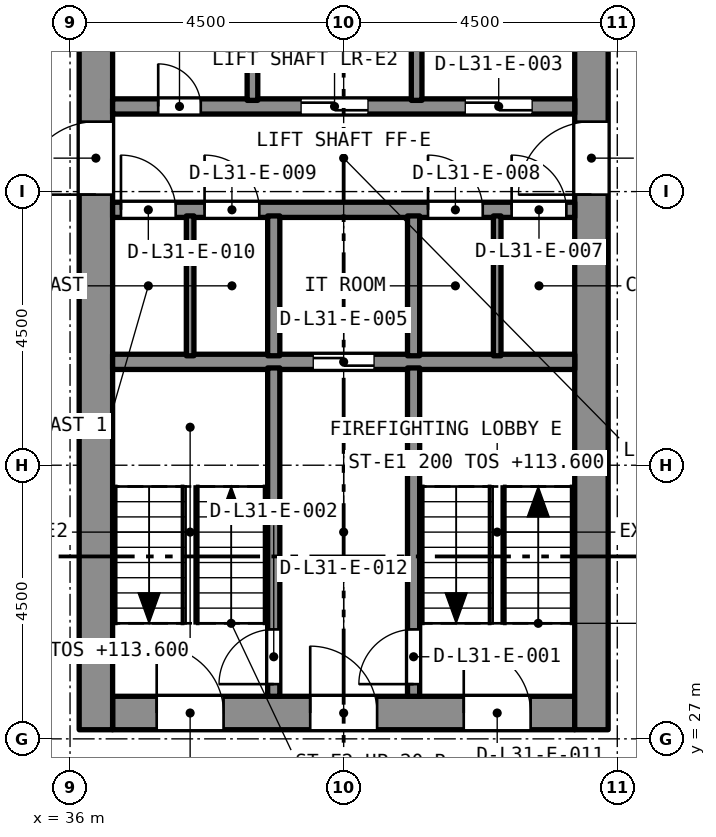
"""IFC4 building model, lengths in metres.
Left out: names, types, materials, properties, quantities, classifications, styles, units other than length and angle.
Written with IfcOpenShell. Run it as: python <this file> out.ifc"""

import sys

from ifc_helpers import new_model, si_unit, direction, frame, frame_2d, origin, place, context, subcontext, project, spatial, rectangle, extrude, element, fill, save


model = new_model("IFC4")
c1 = context("Model", 3, precision=1e-05, world=origin(), true_north=direction((0.0, 1.0)))
c2 = subcontext(c1, "Body", "Model", "MODEL_VIEW")
j1 = project(units=[si_unit("LENGTHUNIT", "METRE"), si_unit("PLANEANGLEUNIT", "RADIAN")], contexts=[c1])
p1 = place(None, origin())
s1 = spatial("IfcSite", under=j1, at=p1, CompositionType="ELEMENT")
p2 = place(p1, origin())
s2 = spatial("IfcBuilding", under=s1, at=p2, CompositionType="ELEMENT")
p3 = place(p2, frame((0.0, 0.0, 112.0)))
s3 = spatial("IfcBuildingStorey", under=s2, at=p3, CompositionType="ELEMENT", Elevation=112.0)
p4 = place(p3, frame((36.7, 27.425, 0.0), z_axis=(0.0, 0.0, 1.0), x_axis=(1.0, 0.0, 0.0)))
e1 = element("IfcWall", 1, at=p4, inside=s3, PredefinedType="SOLIDWALL", context=c2, shape_type="SweptSolid", body=[
    extrude(rectangle(XDim=7.6, YDim=0.55, at=frame_2d((3.8, 0.0))), origin(), (0.0, 0.0, 1.0), 3.2),
])
p5 = place(p4, frame((5.775, 0.0, 0.0)))
e2 = element("IfcOpeningElement", 2, at=p5, cuts=e1, PredefinedType="OPENING", context=c2, shape_type="SweptSolid", body=[
    extrude(rectangle(XDim=1.1, YDim=2.1, at=frame_2d((0.55, 1.05))), frame((0.0, 0.285, 0.0), z_axis=(0.0, -1.0, 0.0), x_axis=(1.0, 0.0, 0.0)), (0.0, 0.0, 1.0), 0.57),
])
p6 = place(p4, frame((3.25, 0.0, 0.0)))
e3 = element("IfcOpeningElement", 3, at=p6, cuts=e1, PredefinedType="OPENING", context=c2, shape_type="SweptSolid", body=[
    extrude(rectangle(XDim=1.1, YDim=2.1, at=frame_2d((0.55, 1.05))), frame((0.0, 0.285, 0.0), z_axis=(0.0, -1.0, 0.0), x_axis=(1.0, 0.0, 0.0)), (0.0, 0.0, 1.0), 0.57),
])
p7 = place(p4, frame((0.725, 0.0, 0.0)))
e4 = element("IfcOpeningElement", 4, at=p7, cuts=e1, PredefinedType="OPENING", context=c2, shape_type="SweptSolid", body=[
    extrude(rectangle(XDim=1.1, YDim=2.1, at=frame_2d((0.55, 1.05))), frame((0.0, 0.285, 0.0), z_axis=(0.0, -1.0, 0.0), x_axis=(1.0, 0.0, 0.0)), (0.0, 0.0, 1.0), 0.57),
])
p8 = place(p3, frame((36.425, 27.15, 0.0), z_axis=(0.0, 0.0, 1.0), x_axis=(0.0, 1.0, 0.0)))
e5 = element("IfcWall", 5, at=p8, inside=s3, PredefinedType="SOLIDWALL", context=c2, shape_type="SweptSolid", body=[
    extrude(rectangle(XDim=13.2, YDim=0.55, at=frame_2d((6.6, 0.0))), origin(), (0.0, 0.0, 1.0), 3.2),
])
p9 = place(p8, frame((8.8, 0.0, 0.0)))
e6 = element("IfcOpeningElement", 6, at=p9, cuts=e5, PredefinedType="OPENING", context=c2, shape_type="SweptSolid", body=[
    extrude(rectangle(XDim=1.2, YDim=2.1, at=frame_2d((0.6, 1.05))), frame((0.0, 0.285, 0.0), z_axis=(0.0, -1.0, 0.0), x_axis=(1.0, 0.0, 0.0)), (0.0, 0.0, 1.0), 0.57),
])
p10 = place(p3, frame((44.575, 27.15, 0.0), z_axis=(0.0, 0.0, 1.0), x_axis=(0.0, 1.0, 0.0)))
e7 = element("IfcWall", 7, at=p10, inside=s3, PredefinedType="SOLIDWALL", context=c2, shape_type="SweptSolid", body=[
    extrude(rectangle(XDim=13.2, YDim=0.55, at=frame_2d((6.6, 0.0))), origin(), (0.0, 0.0, 1.0), 3.2),
])
p11 = place(p10, frame((8.8, 0.0, 0.0)))
e8 = element("IfcOpeningElement", 8, at=p11, cuts=e7, PredefinedType="OPENING", context=c2, shape_type="SweptSolid", body=[
    extrude(rectangle(XDim=1.2, YDim=2.1, at=frame_2d((0.6, 1.05))), frame((0.0, 0.285, 0.0), z_axis=(0.0, -1.0, 0.0), x_axis=(1.0, 0.0, 0.0)), (0.0, 0.0, 1.0), 0.57),
])
p12 = place(p3, frame((36.7, 33.2, 0.0), z_axis=(0.0, 0.0, 1.0), x_axis=(1.0, 0.0, 0.0)))
e9 = element("IfcWall", 9, at=p12, inside=s3, PredefinedType="SOLIDWALL", context=c2, shape_type="SweptSolid", body=[
    extrude(rectangle(XDim=7.6, YDim=0.25, at=frame_2d((3.8, 0.0))), origin(), (0.0, 0.0, 1.0), 2.9),
])
p13 = place(p12, frame((3.3, 0.0, 0.0)))
e10 = element("IfcOpeningElement", 10, at=p13, cuts=e9, PredefinedType="OPENING", context=c2, shape_type="SweptSolid", body=[
    extrude(rectangle(XDim=1.0, YDim=2.1, at=frame_2d((0.5, 1.05))), frame((0.0, 0.135, 0.0), z_axis=(0.0, -1.0, 0.0), x_axis=(1.0, 0.0, 0.0)), (0.0, 0.0, 1.0), 0.27),
])
p14 = place(p3, frame((36.7, 35.7, 0.0), z_axis=(0.0, 0.0, 1.0), x_axis=(1.0, 0.0, 0.0)))
e11 = element("IfcWall", 11, at=p14, inside=s3, PredefinedType="SOLIDWALL", context=c2, shape_type="SweptSolid", body=[
    extrude(rectangle(XDim=7.6, YDim=0.25, at=frame_2d((3.8, 0.0))), origin(), (0.0, 0.0, 1.0), 2.9),
])
p15 = place(p14, frame((6.562, 0.0, 0.0)))
e12 = element("IfcOpeningElement", 12, at=p15, cuts=e11, PredefinedType="OPENING", context=c2, shape_type="SweptSolid", body=[
    extrude(rectangle(XDim=0.9, YDim=2.1, at=frame_2d((0.45, 1.05))), frame((0.0, 0.135, 0.0), z_axis=(0.0, -1.0, 0.0), x_axis=(1.0, 0.0, 0.0)), (0.0, 0.0, 1.0), 0.27),
])
p16 = place(p14, frame((5.188, 0.0, 0.0)))
e13 = element("IfcOpeningElement", 13, at=p16, cuts=e11, PredefinedType="OPENING", context=c2, shape_type="SweptSolid", body=[
    extrude(rectangle(XDim=0.9, YDim=2.1, at=frame_2d((0.45, 1.05))), frame((0.0, 0.135, 0.0), z_axis=(0.0, -1.0, 0.0), x_axis=(1.0, 0.0, 0.0)), (0.0, 0.0, 1.0), 0.27),
])
p17 = place(p14, frame((1.512, 0.0, 0.0)))
e14 = element("IfcOpeningElement", 14, at=p17, cuts=e11, PredefinedType="OPENING", context=c2, shape_type="SweptSolid", body=[
    extrude(rectangle(XDim=0.9, YDim=2.1, at=frame_2d((0.45, 1.05))), frame((0.0, 0.135, 0.0), z_axis=(0.0, -1.0, 0.0), x_axis=(1.0, 0.0, 0.0)), (0.0, 0.0, 1.0), 0.27),
])
p18 = place(p14, frame((0.137, 0.0, 0.0)))
e15 = element("IfcOpeningElement", 15, at=p18, cuts=e11, PredefinedType="OPENING", context=c2, shape_type="SweptSolid", body=[
    extrude(rectangle(XDim=0.9, YDim=2.1, at=frame_2d((0.45, 1.05))), frame((0.0, 0.135, 0.0), z_axis=(0.0, -1.0, 0.0), x_axis=(1.0, 0.0, 0.0)), (0.0, 0.0, 1.0), 0.27),
])
p19 = place(p3, frame((36.7, 37.4, 0.0), z_axis=(0.0, 0.0, 1.0), x_axis=(1.0, 0.0, 0.0)))
e16 = element("IfcWall", 16, at=p19, inside=s3, PredefinedType="SOLIDWALL", context=c2, shape_type="SweptSolid", body=[
    extrude(rectangle(XDim=7.6, YDim=0.25, at=frame_2d((3.8, 0.0))), origin(), (0.0, 0.0, 1.0), 2.9),
])
p20 = place(p19, frame((5.8, 0.0, 0.0)))
e17 = element("IfcOpeningElement", 17, at=p20, cuts=e16, PredefinedType="OPENING", context=c2, shape_type="SweptSolid", body=[
    extrude(rectangle(XDim=1.1, YDim=2.4, at=frame_2d((0.55, 1.2))), frame((0.0, 0.135, 0.0), z_axis=(0.0, -1.0, 0.0), x_axis=(1.0, 0.0, 0.0)), (0.0, 0.0, 1.0), 0.27),
])
p21 = place(p19, frame((3.1, 0.0, 0.0)))
e18 = element("IfcOpeningElement", 18, at=p21, cuts=e16, PredefinedType="OPENING", context=c2, shape_type="SweptSolid", body=[
    extrude(rectangle(XDim=1.1, YDim=2.4, at=frame_2d((0.55, 1.2))), frame((0.0, 0.135, 0.0), z_axis=(0.0, -1.0, 0.0), x_axis=(1.0, 0.0, 0.0)), (0.0, 0.0, 1.0), 0.27),
])
p22 = place(p19, frame((0.75, 0.0, 0.0)))
e19 = element("IfcOpeningElement", 19, at=p22, cuts=e16, PredefinedType="OPENING", context=c2, shape_type="SweptSolid", body=[
    extrude(rectangle(XDim=0.7, YDim=2.1, at=frame_2d((0.35, 1.05))), frame((0.0, 0.135, 0.0), z_axis=(0.0, -1.0, 0.0), x_axis=(1.0, 0.0, 0.0)), (0.0, 0.0, 1.0), 0.27),
])
p23 = place(p3, frame((41.65, 27.7, 0.0), z_axis=(0.0, 0.0, 1.0), x_axis=(0.0, 1.0, 0.0)))
e20 = element("IfcWall", 20, at=p23, inside=s3, PredefinedType="SOLIDWALL", context=c2, shape_type="SweptSolid", body=[
    extrude(rectangle(XDim=5.4, YDim=0.2, at=frame_2d((2.7, 0.0))), origin(), (0.0, 0.0, 1.0), 2.9),
])
p24 = place(p23, frame((0.2, 0.0, 0.0)))
e21 = element("IfcOpeningElement", 21, at=p24, cuts=e20, PredefinedType="OPENING", context=c2, shape_type="SweptSolid", body=[
    extrude(rectangle(XDim=0.9, YDim=2.1, at=frame_2d((0.45, 1.05))), frame((0.0, 0.11, 0.0), z_axis=(0.0, -1.0, 0.0), x_axis=(1.0, 0.0, 0.0)), (0.0, 0.0, 1.0), 0.22),
])
p25 = place(p3, frame((39.35, 27.7, 0.0), z_axis=(0.0, 0.0, 1.0), x_axis=(0.0, 1.0, 0.0)))
e22 = element("IfcWall", 22, at=p25, inside=s3, PredefinedType="SOLIDWALL", context=c2, shape_type="SweptSolid", body=[
    extrude(rectangle(XDim=5.4, YDim=0.2, at=frame_2d((2.7, 0.0))), origin(), (0.0, 0.0, 1.0), 2.9),
])
p26 = place(p25, frame((0.2, 0.0, 0.0)))
e23 = element("IfcOpeningElement", 23, at=p26, cuts=e22, PredefinedType="OPENING", context=c2, shape_type="SweptSolid", body=[
    extrude(rectangle(XDim=0.9, YDim=2.1, at=frame_2d((0.45, 1.05))), frame((0.0, 0.11, 0.0), z_axis=(0.0, -1.0, 0.0), x_axis=(1.0, 0.0, 0.0)), (0.0, 0.0, 1.0), 0.22),
])
for number, where, z_axis, x_axis in (
    (24, (41.65, 33.3, 0.0), (0.0, 0.0, 1.0), (0.0, 1.0, 0.0)),
    (25, (39.35, 33.3, 0.0), (0.0, 0.0, 1.0), (0.0, 1.0, 0.0)),
):
    element("IfcWall", number, at=place(p3, frame(where, z_axis=z_axis, x_axis=x_axis)), inside=s3, PredefinedType="SOLIDWALL", context=c2, shape_type="SweptSolid", body=[
        extrude(rectangle(XDim=2.3, YDim=0.2, at=frame_2d((1.15, 0.0))), origin(), (0.0, 0.0, 1.0), 2.9),
    ])
for number, where, z_axis, x_axis in (
    (26, (41.7, 37.5, 0.0), (0.0, 0.0, 1.0), (0.0, 1.0, 0.0)),
    (27, (39.0, 37.5, 0.0), (0.0, 0.0, 1.0), (0.0, 1.0, 0.0)),
):
    element("IfcWall", number, at=place(p3, frame(where, z_axis=z_axis, x_axis=x_axis)), inside=s3, PredefinedType="SOLIDWALL", context=c2, shape_type="SweptSolid", body=[
        extrude(rectangle(XDim=2.3, YDim=0.175, at=frame_2d((1.15, 0.0))), origin(), (0.0, 0.0, 1.0), 2.9),
    ])
for number, where, z_axis, x_axis in (
    (28, (43.025, 33.3, 0.0), (0.0, 0.0, 1.0), (0.0, 1.0, 0.0)),
    (29, (37.975, 33.3, 0.0), (0.0, 0.0, 1.0), (0.0, 1.0, 0.0)),
):
    element("IfcWall", number, at=place(p3, frame(where, z_axis=z_axis, x_axis=x_axis)), inside=s3, PredefinedType="PARTITIONING", context=c2, shape_type="SweptSolid", body=[
        extrude(rectangle(XDim=2.3, YDim=0.125, at=frame_2d((1.15, 0.0))), origin(), (0.0, 0.0, 1.0), 2.9),
    ])
p27 = place(p24, origin())
e30 = element("IfcDoor", 30, at=p27, inside=s3, OperationType="SINGLE_SWING_LEFT", PredefinedType="DOOR", context=c2, shape_type="SweptSolid", body=[
    extrude(rectangle(XDim=0.9, YDim=2.1, at=frame_2d((0.45, 1.05))), frame((0.0, 0.025, 0.0), z_axis=(0.0, -1.0, 0.0), x_axis=(1.0, 0.0, 0.0)), (0.0, 0.0, 1.0), 0.05),
])
fill(e21, e30)
p28 = place(p26, origin())
e31 = element("IfcDoor", 31, at=p28, inside=s3, OperationType="SINGLE_SWING_LEFT", PredefinedType="DOOR", context=c2, shape_type="SweptSolid", body=[
    extrude(rectangle(XDim=0.9, YDim=2.1, at=frame_2d((0.45, 1.05))), frame((0.0, 0.025, 0.0), z_axis=(0.0, -1.0, 0.0), x_axis=(1.0, 0.0, 0.0)), (0.0, 0.0, 1.0), 0.05),
])
fill(e23, e31)
p29 = place(p20, origin())
e32 = element("IfcDoor", 32, at=p29, inside=s3, OperationType="SLIDING_TO_LEFT", PredefinedType="DOOR", context=c2, shape_type="SweptSolid", body=[
    extrude(rectangle(XDim=1.1, YDim=2.4, at=frame_2d((0.55, 1.2))), frame((0.0, 0.025, 0.0), z_axis=(0.0, -1.0, 0.0), x_axis=(1.0, 0.0, 0.0)), (0.0, 0.0, 1.0), 0.05),
])
fill(e17, e32)
p30 = place(p21, origin())
e33 = element("IfcDoor", 33, at=p30, inside=s3, OperationType="SLIDING_TO_LEFT", PredefinedType="DOOR", context=c2, shape_type="SweptSolid", body=[
    extrude(rectangle(XDim=1.1, YDim=2.4, at=frame_2d((0.55, 1.2))), frame((0.0, 0.025, 0.0), z_axis=(0.0, -1.0, 0.0), x_axis=(1.0, 0.0, 0.0)), (0.0, 0.0, 1.0), 0.05),
])
fill(e18, e33)
p31 = place(p13, origin())
e34 = element("IfcDoor", 34, at=p31, inside=s3, OperationType="SLIDING_TO_LEFT", PredefinedType="DOOR", context=c2, shape_type="SweptSolid", body=[
    extrude(rectangle(XDim=1.0, YDim=2.1, at=frame_2d((0.5, 1.05))), frame((0.0, 0.025, 0.0), z_axis=(0.0, -1.0, 0.0), x_axis=(1.0, 0.0, 0.0)), (0.0, 0.0, 1.0), 0.05),
])
fill(e10, e34)
p32 = place(p22, origin())
e35 = element("IfcDoor", 35, at=p32, inside=s3, OperationType="SINGLE_SWING_LEFT", PredefinedType="DOOR", context=c2, shape_type="SweptSolid", body=[
    extrude(rectangle(XDim=0.7, YDim=2.1, at=frame_2d((0.35, 1.05))), frame((0.0, 0.025, 0.0), z_axis=(0.0, -1.0, 0.0), x_axis=(1.0, 0.0, 0.0)), (0.0, 0.0, 1.0), 0.05),
])
fill(e19, e35)
p33 = place(p15, origin())
e36 = element("IfcDoor", 36, at=p33, inside=s3, OperationType="SINGLE_SWING_LEFT", PredefinedType="DOOR", context=c2, shape_type="SweptSolid", body=[
    extrude(rectangle(XDim=0.9, YDim=2.1, at=frame_2d((0.45, 1.05))), frame((0.0, 0.025, 0.0), z_axis=(0.0, -1.0, 0.0), x_axis=(1.0, 0.0, 0.0)), (0.0, 0.0, 1.0), 0.05),
])
fill(e12, e36)
p34 = place(p16, origin())
e37 = element("IfcDoor", 37, at=p34, inside=s3, OperationType="SINGLE_SWING_LEFT", PredefinedType="DOOR", context=c2, shape_type="SweptSolid", body=[
    extrude(rectangle(XDim=0.9, YDim=2.1, at=frame_2d((0.45, 1.05))), frame((0.0, 0.025, 0.0), z_axis=(0.0, -1.0, 0.0), x_axis=(1.0, 0.0, 0.0)), (0.0, 0.0, 1.0), 0.05),
])
fill(e13, e37)
p35 = place(p17, origin())
e38 = element("IfcDoor", 38, at=p35, inside=s3, OperationType="SINGLE_SWING_LEFT", PredefinedType="DOOR", context=c2, shape_type="SweptSolid", body=[
    extrude(rectangle(XDim=0.9, YDim=2.1, at=frame_2d((0.45, 1.05))), frame((0.0, 0.025, 0.0), z_axis=(0.0, -1.0, 0.0), x_axis=(1.0, 0.0, 0.0)), (0.0, 0.0, 1.0), 0.05),
])
fill(e14, e38)
p36 = place(p18, origin())
e39 = element("IfcDoor", 39, at=p36, inside=s3, OperationType="SINGLE_SWING_LEFT", PredefinedType="DOOR", context=c2, shape_type="SweptSolid", body=[
    extrude(rectangle(XDim=0.9, YDim=2.1, at=frame_2d((0.45, 1.05))), frame((0.0, 0.025, 0.0), z_axis=(0.0, -1.0, 0.0), x_axis=(1.0, 0.0, 0.0)), (0.0, 0.0, 1.0), 0.05),
])
fill(e15, e39)
p37 = place(p5, origin())
e40 = element("IfcDoor", 40, at=p37, inside=s3, OperationType="SINGLE_SWING_LEFT", PredefinedType="DOOR", context=c2, shape_type="SweptSolid", body=[
    extrude(rectangle(XDim=1.1, YDim=2.1, at=frame_2d((0.55, 1.05))), frame((0.0, 0.025, 0.0), z_axis=(0.0, -1.0, 0.0), x_axis=(1.0, 0.0, 0.0)), (0.0, 0.0, 1.0), 0.05),
])
fill(e2, e40)
p38 = place(p6, origin())
e41 = element("IfcDoor", 41, at=p38, inside=s3, OperationType="SINGLE_SWING_LEFT", PredefinedType="DOOR", context=c2, shape_type="SweptSolid", body=[
    extrude(rectangle(XDim=1.1, YDim=2.1, at=frame_2d((0.55, 1.05))), frame((0.0, 0.025, 0.0), z_axis=(0.0, -1.0, 0.0), x_axis=(1.0, 0.0, 0.0)), (0.0, 0.0, 1.0), 0.05),
])
fill(e3, e41)
p39 = place(p7, origin())
e42 = element("IfcDoor", 42, at=p39, inside=s3, OperationType="SINGLE_SWING_LEFT", PredefinedType="DOOR", context=c2, shape_type="SweptSolid", body=[
    extrude(rectangle(XDim=1.1, YDim=2.1, at=frame_2d((0.55, 1.05))), frame((0.0, 0.025, 0.0), z_axis=(0.0, -1.0, 0.0), x_axis=(1.0, 0.0, 0.0)), (0.0, 0.0, 1.0), 0.05),
])
fill(e4, e42)
p40 = place(p9, origin())
e43 = element("IfcDoor", 43, at=p40, inside=s3, OperationType="SINGLE_SWING_LEFT", PredefinedType="DOOR", context=c2, shape_type="SweptSolid", body=[
    extrude(rectangle(XDim=1.2, YDim=2.1, at=frame_2d((0.6, 1.05))), frame((0.0, 0.025, 0.0), z_axis=(0.0, -1.0, 0.0), x_axis=(1.0, 0.0, 0.0)), (0.0, 0.0, 1.0), 0.05),
])
fill(e6, e43)
p41 = place(p11, origin())
e44 = element("IfcDoor", 44, at=p41, inside=s3, OperationType="SINGLE_SWING_LEFT", PredefinedType="DOOR", context=c2, shape_type="SweptSolid", body=[
    extrude(rectangle(XDim=1.2, YDim=2.1, at=frame_2d((0.6, 1.05))), frame((0.0, 0.025, 0.0), z_axis=(0.0, -1.0, 0.0), x_axis=(1.0, 0.0, 0.0)), (0.0, 0.0, 1.0), 0.05),
])
fill(e8, e44)
save(model, sys.argv[1])
